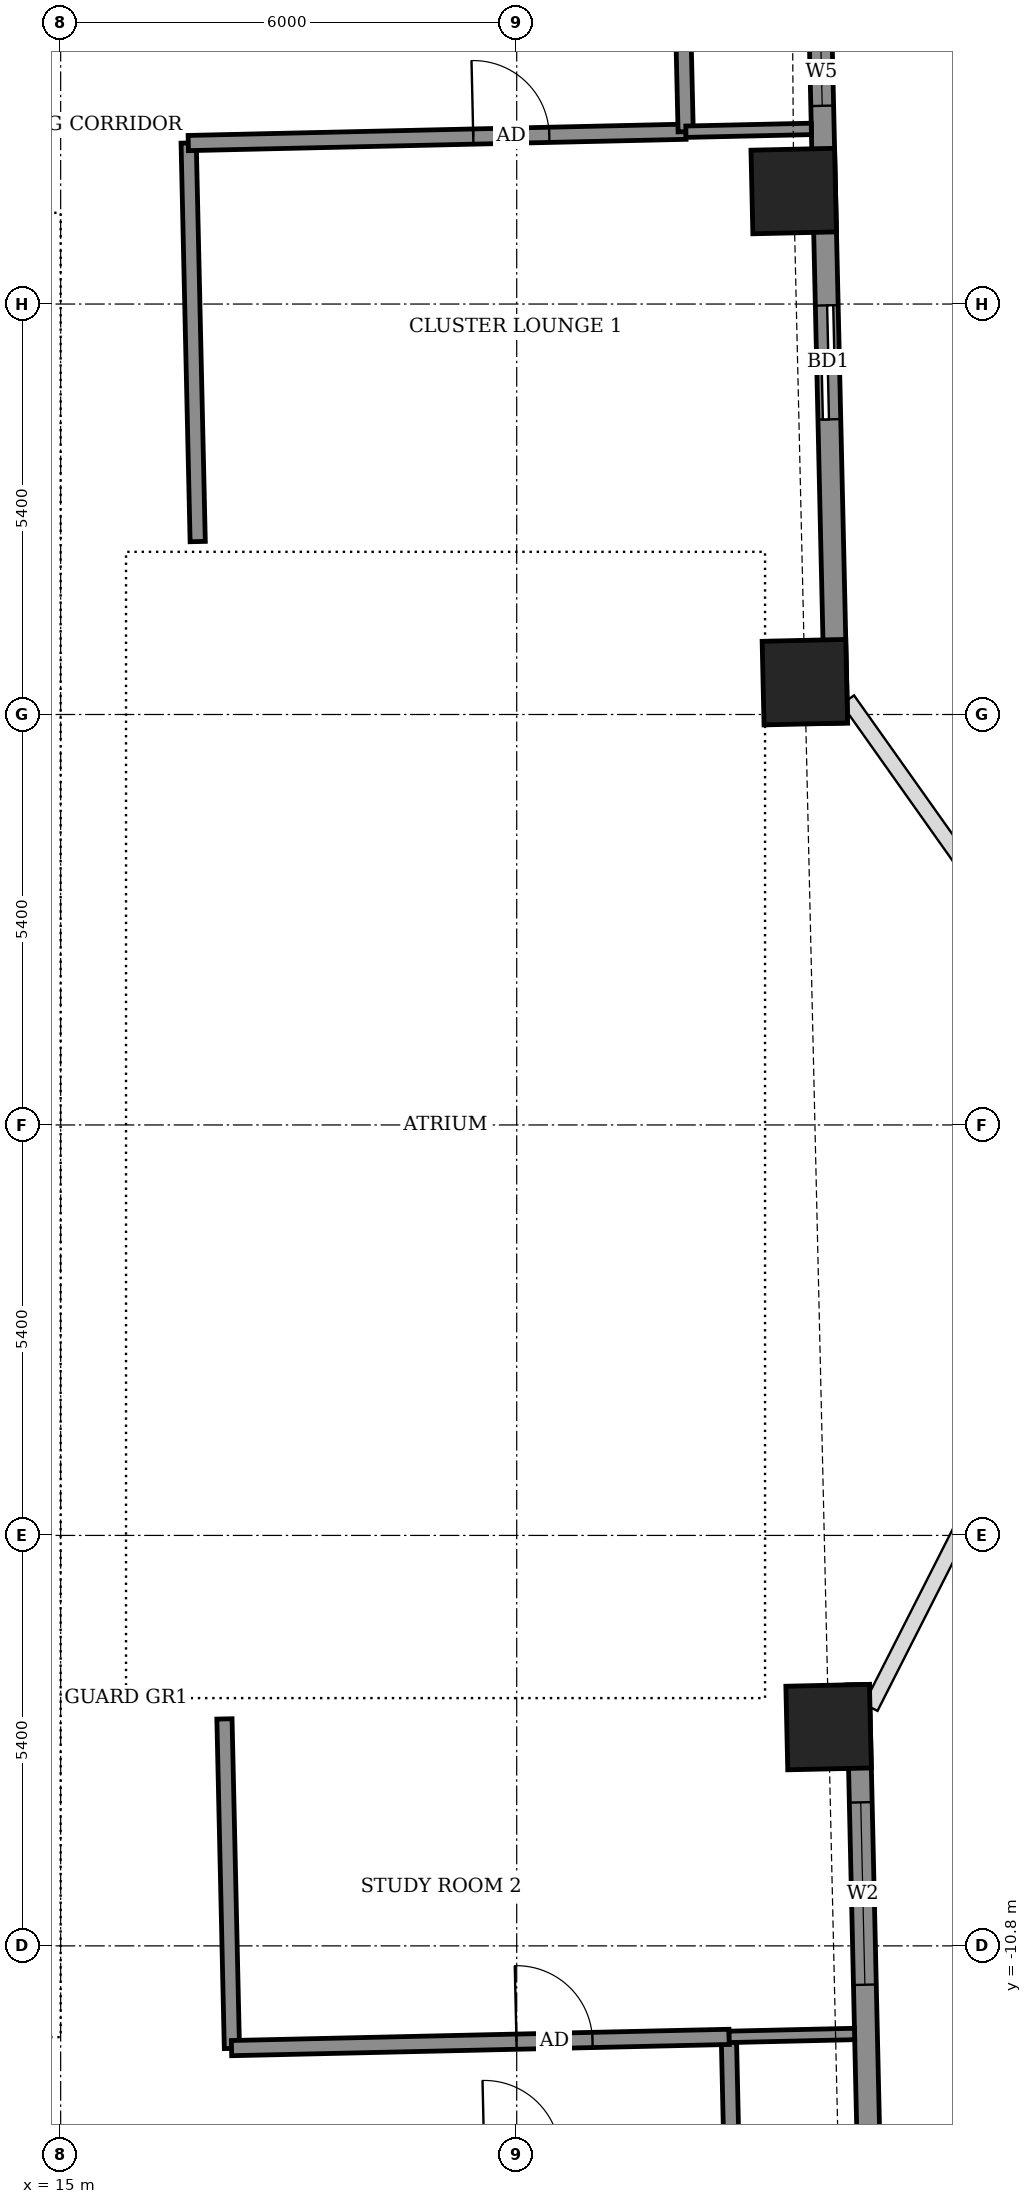
"""IFC4 building model, lengths in metres.
Left out: names, types, materials, properties, quantities, classifications, styles, units other than length and angle.
Written with IfcOpenShell. Run it as: python <this file> out.ifc"""

import sys

from ifc_helpers import new_model, si_unit, direction, frame, frame_2d, origin, origin_2d, place, context, subcontext, project, spatial, rectangle, extrude, element, fill, save


model = new_model("IFC4")
c1 = context("Model", 3, precision=1e-05, world=origin(), true_north=direction((0.0, 1.0)))
c2 = subcontext(c1, "Body", "Model", "MODEL_VIEW")
j1 = project(units=[si_unit("LENGTHUNIT", "METRE"), si_unit("PLANEANGLEUNIT", "RADIAN")], contexts=[c1])
p1 = place(None, origin())
s1 = spatial("IfcSite", under=j1, at=p1, CompositionType="ELEMENT")
p2 = place(p1, origin())
s2 = spatial("IfcBuilding", under=s1, at=p2, CompositionType="ELEMENT")
p3 = place(p2, frame((0.0, 0.0, 231.1)))
s3 = spatial("IfcBuildingStorey", under=s2, at=p3, CompositionType="ELEMENT", Elevation=231.1)
for number, where, z_axis, x_axis in (
    (1, (25.103, -7.921, -0.55), (0.0, 0.0, 1.0), (-0.023, 1.0, 0.0)),
    (2, (24.791, 5.825, -0.55), (0.0, 0.0, 1.0), (-0.023, 1.0, 0.0)),
    (3, (24.644, 12.287, -0.55), (0.0, 0.0, 1.0), (-0.023, 1.0, 0.0)),
):
    element("IfcColumn", number, at=place(p3, frame(where, z_axis=z_axis, x_axis=x_axis)), inside=s3, PredefinedType="COLUMN", context=c2, shape_type="SweptSolid", body=[
        extrude(rectangle(XDim=1.1, YDim=1.1, at=origin_2d()), origin(), (0.0, 0.0, 1.0), 3.6),
    ])
p4 = place(p3, frame((25.77, -19.684, 0.0), z_axis=(0.0, 0.0, 1.0), x_axis=(-0.022642656789, 0.999743622182, 0.0)))
e4 = element("IfcWall", 4, at=p4, inside=s3, PredefinedType="SOLIDWALL", context=c2, shape_type="SweptSolid", body=[
    extrude(rectangle(XDim=12.324, YDim=0.3, at=frame_2d((6.162, 0.0))), origin(), (0.0, 0.0, 1.0), 2.55),
])
p5 = place(p4, frame((2.38, 0.0, 0.0)))
e5 = element("IfcOpeningElement", 5, at=p5, cuts=e4, PredefinedType="OPENING", context=c2, shape_type="SweptSolid", body=[
    extrude(rectangle(XDim=1.5, YDim=2.4, at=frame_2d((0.75, 1.2))), frame((0.0, 0.16, 0.0), z_axis=(0.0, -1.0, 0.0), x_axis=(1.0, 0.0, 0.0)), (0.0, 0.0, 1.0), 0.32),
])
p6 = place(p4, frame((8.375, 0.0, 0.9)))
e6 = element("IfcOpeningElement", 6, at=p6, cuts=e4, PredefinedType="OPENING", context=c2, shape_type="SweptSolid", body=[
    extrude(rectangle(XDim=2.4, YDim=1.5, at=frame_2d((1.2, 0.75))), frame((0.0, 0.16, 0.0), z_axis=(0.0, -1.0, 0.0), x_axis=(1.0, 0.0, 0.0)), (0.0, 0.0, 1.0), 0.32),
])
p7 = place(p3, frame((25.204, 5.285, 0.0), z_axis=(0.0, 0.0, 1.0), x_axis=(-0.022756783174, 0.999741030877, 0.0)))
e7 = element("IfcWall", 7, at=p7, inside=s3, PredefinedType="SOLIDWALL", context=c2, shape_type="SweptSolid", body=[
    extrude(rectangle(XDim=13.324, YDim=0.3, at=frame_2d((6.662, 0.0))), origin(), (0.0, 0.0, 1.0), 2.55),
])
p8 = place(p7, frame((3.999, 0.0, 0.0)))
e8 = element("IfcOpeningElement", 8, at=p8, cuts=e7, PredefinedType="OPENING", context=c2, shape_type="SweptSolid", body=[
    extrude(rectangle(XDim=1.5, YDim=2.4, at=frame_2d((0.75, 1.2))), frame((0.0, 0.16, 0.0), z_axis=(0.0, -1.0, 0.0), x_axis=(1.0, 0.0, 0.0)), (0.0, 0.0, 1.0), 0.32),
])
p9 = place(p7, frame((8.125, 0.0, 0.9)))
e9 = element("IfcOpeningElement", 9, at=p9, cuts=e7, PredefinedType="OPENING", context=c2, shape_type="SweptSolid", body=[
    extrude(rectangle(XDim=0.9, YDim=1.5, at=frame_2d((0.45, 0.75))), frame((0.0, 0.16, 0.0), z_axis=(0.0, -1.0, 0.0), x_axis=(1.0, 0.0, 0.0)), (0.0, 0.0, 1.0), 0.32),
])
p10 = place(p7, frame((9.763, 0.0, 0.9)))
e10 = element("IfcOpeningElement", 10, at=p10, cuts=e7, PredefinedType="OPENING", context=c2, shape_type="SweptSolid", body=[
    extrude(rectangle(XDim=2.4, YDim=1.5, at=frame_2d((1.2, 0.75))), frame((0.0, 0.16, 0.0), z_axis=(0.0, -1.0, 0.0), x_axis=(1.0, 0.0, 0.0)), (0.0, 0.0, 1.0), 0.32),
])
p11 = place(p3, frame((23.825, -13.5, 0.0), z_axis=(0.0, 0.0, 1.0), x_axis=(-0.022632637625, 0.99974384905, 0.0)))
e11 = element("IfcWall", 11, at=p11, inside=s3, PredefinedType="PARTITIONING", context=c2, shape_type="SweptSolid", body=[
    extrude(rectangle(XDim=1.5, YDim=0.2, at=frame_2d((0.75, 0.0))), origin(), (0.0, 0.0, 1.0), 3.05),
])
p12 = place(p3, frame((17.253, -12.149, 0.0), z_axis=(0.0, 0.0, 1.0), x_axis=(-0.022578158225, 0.999745080894, 0.0)))
e12 = element("IfcWall", 12, at=p12, inside=s3, PredefinedType="PARTITIONING", context=c2, shape_type="SweptSolid", body=[
    extrude(rectangle(XDim=4.336, YDim=0.2, at=frame_2d((2.168, 0.0))), origin(), (0.0, 0.0, 1.0), 3.05),
])
p13 = place(p3, frame((17.248, -12.145, 0.0), z_axis=(0.0, 0.0, 1.0), x_axis=(0.999744752818, 0.022592680497, 0.0)))
e13 = element("IfcWall", 13, at=p13, inside=s3, PredefinedType="PARTITIONING", context=c2, shape_type="SweptSolid", body=[
    extrude(rectangle(XDim=6.549, YDim=0.2, at=frame_2d((3.274, 0.0))), origin(), (0.0, 0.0, 1.0), 3.05),
])
p14 = place(p13, frame((3.75, 0.0, 0.0)))
e14 = element("IfcOpeningElement", 14, at=p14, cuts=e13, PredefinedType="OPENING", context=c2, shape_type="SweptSolid", body=[
    extrude(rectangle(XDim=1.0, YDim=2.1, at=frame_2d((0.5, 1.05))), frame((0.0, 0.11, 0.0), z_axis=(0.0, -1.0, 0.0), x_axis=(1.0, 0.0, 0.0)), (0.0, 0.0, 1.0), 0.22),
])
p15 = place(p3, frame((23.795, -11.997, 0.0), z_axis=(0.0, 0.0, 1.0), x_axis=(0.999733755381, 0.023074192312, 0.0)))
e15 = element("IfcWall", 15, at=p15, inside=s3, PredefinedType="PARTITIONING", context=c2, shape_type="SweptSolid", body=[
    extrude(rectangle(XDim=1.651, YDim=0.15, at=frame_2d((0.825, 0.0))), origin(), (0.0, 0.0, 1.0), 2.55),
])
p16 = place(p3, frame((16.803, 7.675, 0.0), z_axis=(0.0, 0.0, 1.0), x_axis=(-0.022667483124, 0.999743059595, 0.0)))
e16 = element("IfcWall", 16, at=p16, inside=s3, PredefinedType="PARTITIONING", context=c2, shape_type="SweptSolid", body=[
    extrude(rectangle(XDim=5.245, YDim=0.2, at=frame_2d((2.623, 0.0))), origin(), (0.0, 0.0, 1.0), 3.05),
])
p17 = place(p3, frame((16.679, 12.918, 0.0), z_axis=(0.0, 0.0, 1.0), x_axis=(0.99974139269, 0.022740882632, 0.0)))
e17 = element("IfcWall", 17, at=p17, inside=s3, PredefinedType="PARTITIONING", context=c2, shape_type="SweptSolid", body=[
    extrude(rectangle(XDim=6.549, YDim=0.2, at=frame_2d((3.274, 0.0))), origin(), (0.0, 0.0, 1.0), 3.05),
])
p18 = place(p17, frame((3.75, 0.0, 0.0)))
e18 = element("IfcOpeningElement", 18, at=p18, cuts=e17, PredefinedType="OPENING", context=c2, shape_type="SweptSolid", body=[
    extrude(rectangle(XDim=1.0, YDim=2.1, at=frame_2d((0.5, 1.05))), frame((0.0, 0.11, 0.0), z_axis=(0.0, -1.0, 0.0), x_axis=(1.0, 0.0, 0.0)), (0.0, 0.0, 1.0), 0.22),
])
p19 = place(p3, frame((23.223, 13.067, 0.0), z_axis=(0.0, 0.0, 1.0), x_axis=(-0.023268438023, 0.999729253244, 0.0)))
e19 = element("IfcWall", 19, at=p19, inside=s3, PredefinedType="PARTITIONING", context=c2, shape_type="SweptSolid", body=[
    extrude(rectangle(XDim=1.5, YDim=0.2, at=frame_2d((0.75, 0.0))), origin(), (0.0, 0.0, 1.0), 3.05),
])
p20 = place(p3, frame((23.226, 13.067, 0.0), z_axis=(0.0, 0.0, 1.0), x_axis=(0.999747154012, 0.022486174521, 0.0)))
e20 = element("IfcWall", 20, at=p20, inside=s3, PredefinedType="PARTITIONING", context=c2, shape_type="SweptSolid", body=[
    extrude(rectangle(XDim=1.65, YDim=0.15, at=frame_2d((0.825, 0.0))), origin(), (0.0, 0.0, 1.0), 2.55),
])
p21 = place(p3, frame((-27.652, 13.413, 0.0), z_axis=(0.0, 0.0, 1.0), x_axis=(0.999742610679, 0.022687273792, 0.0)))
e21 = element("IfcWall", 21, at=p21, inside=s3, PredefinedType="PARTITIONING", context=c2, shape_type="SweptSolid", body=[
    extrude(rectangle(XDim=50.857, YDim=0.2, at=frame_2d((25.429, 0.0))), origin(), (0.0, 0.0, 1.0), 3.05),
])
p22 = place(p21, frame((49.179, 0.0, 0.0)))
e22 = element("IfcOpeningElement", 22, at=p22, cuts=e21, PredefinedType="OPENING", context=c2, shape_type="SweptSolid", body=[
    extrude(rectangle(XDim=1.0, YDim=2.1, at=frame_2d((0.5, 1.05))), frame((0.0, 0.11, 0.0), z_axis=(0.0, -1.0, 0.0), x_axis=(1.0, 0.0, 0.0)), (0.0, 0.0, 1.0), 0.22),
])
p23 = place(p21, frame((44.9, 0.0, 0.0)))
e23 = element("IfcOpeningElement", 23, at=p23, cuts=e21, PredefinedType="OPENING", context=c2, shape_type="SweptSolid", body=[
    extrude(rectangle(XDim=0.9, YDim=2.1, at=frame_2d((0.45, 1.05))), frame((0.0, 0.11, 0.0), z_axis=(0.0, -1.0, 0.0), x_axis=(1.0, 0.0, 0.0)), (0.0, 0.0, 1.0), 0.22),
])
p24 = place(p21, frame((40.375, 0.0, 0.0)))
e24 = element("IfcOpeningElement", 24, at=p24, cuts=e21, PredefinedType="OPENING", context=c2, shape_type="SweptSolid", body=[
    extrude(rectangle(XDim=0.9, YDim=2.1, at=frame_2d((0.45, 1.05))), frame((0.0, 0.11, 0.0), z_axis=(0.0, -1.0, 0.0), x_axis=(1.0, 0.0, 0.0)), (0.0, 0.0, 1.0), 0.22),
])
p25 = place(p21, frame((38.425, 0.0, 0.0)))
e25 = element("IfcOpeningElement", 25, at=p25, cuts=e21, PredefinedType="OPENING", context=c2, shape_type="SweptSolid", body=[
    extrude(rectangle(XDim=0.9, YDim=2.1, at=frame_2d((0.45, 1.05))), frame((0.0, 0.11, 0.0), z_axis=(0.0, -1.0, 0.0), x_axis=(1.0, 0.0, 0.0)), (0.0, 0.0, 1.0), 0.22),
])
p26 = place(p21, frame((31.625, 0.0, 0.0)))
e26 = element("IfcOpeningElement", 26, at=p26, cuts=e21, PredefinedType="OPENING", context=c2, shape_type="SweptSolid", body=[
    extrude(rectangle(XDim=0.9, YDim=2.1, at=frame_2d((0.45, 1.05))), frame((0.0, 0.11, 0.0), z_axis=(0.0, -1.0, 0.0), x_axis=(1.0, 0.0, 0.0)), (0.0, 0.0, 1.0), 0.22),
])
p27 = place(p21, frame((29.7, 0.0, 0.0)))
e27 = element("IfcOpeningElement", 27, at=p27, cuts=e21, PredefinedType="OPENING", context=c2, shape_type="SweptSolid", body=[
    extrude(rectangle(XDim=0.9, YDim=2.1, at=frame_2d((0.45, 1.05))), frame((0.0, 0.11, 0.0), z_axis=(0.0, -1.0, 0.0), x_axis=(1.0, 0.0, 0.0)), (0.0, 0.0, 1.0), 0.22),
])
p28 = place(p21, frame((22.95, 0.0, 0.0)))
e28 = element("IfcOpeningElement", 28, at=p28, cuts=e21, PredefinedType="OPENING", context=c2, shape_type="SweptSolid", body=[
    extrude(rectangle(XDim=0.9, YDim=2.1, at=frame_2d((0.45, 1.05))), frame((0.0, 0.11, 0.0), z_axis=(0.0, -1.0, 0.0), x_axis=(1.0, 0.0, 0.0)), (0.0, 0.0, 1.0), 0.22),
])
p29 = place(p21, frame((20.95, 0.0, 0.0)))
e29 = element("IfcOpeningElement", 29, at=p29, cuts=e21, PredefinedType="OPENING", context=c2, shape_type="SweptSolid", body=[
    extrude(rectangle(XDim=0.9, YDim=2.1, at=frame_2d((0.45, 1.05))), frame((0.0, 0.11, 0.0), z_axis=(0.0, -1.0, 0.0), x_axis=(1.0, 0.0, 0.0)), (0.0, 0.0, 1.0), 0.22),
])
p30 = place(p21, frame((14.15, 0.0, 0.0)))
e30 = element("IfcOpeningElement", 30, at=p30, cuts=e21, PredefinedType="OPENING", context=c2, shape_type="SweptSolid", body=[
    extrude(rectangle(XDim=0.9, YDim=2.1, at=frame_2d((0.45, 1.05))), frame((0.0, 0.11, 0.0), z_axis=(0.0, -1.0, 0.0), x_axis=(1.0, 0.0, 0.0)), (0.0, 0.0, 1.0), 0.22),
])
p31 = place(p21, frame((12.2, 0.0, 0.0)))
e31 = element("IfcOpeningElement", 31, at=p31, cuts=e21, PredefinedType="OPENING", context=c2, shape_type="SweptSolid", body=[
    extrude(rectangle(XDim=0.9, YDim=2.1, at=frame_2d((0.45, 1.05))), frame((0.0, 0.11, 0.0), z_axis=(0.0, -1.0, 0.0), x_axis=(1.0, 0.0, 0.0)), (0.0, 0.0, 1.0), 0.22),
])
p32 = place(p21, frame((2.05, 0.0, 0.0)))
e32 = element("IfcOpeningElement", 32, at=p32, cuts=e21, PredefinedType="OPENING", context=c2, shape_type="SweptSolid", body=[
    extrude(rectangle(XDim=1.0, YDim=2.1, at=frame_2d((0.5, 1.05))), frame((0.0, 0.11, 0.0), z_axis=(0.0, -1.0, 0.0), x_axis=(1.0, 0.0, 0.0)), (0.0, 0.0, 1.0), 0.22),
])
p33 = place(p21, frame((7.45, 0.0, 0.0)))
e33 = element("IfcOpeningElement", 33, at=p33, cuts=e21, PredefinedType="OPENING", context=c2, shape_type="SweptSolid", body=[
    extrude(rectangle(XDim=0.9, YDim=2.1, at=frame_2d((0.45, 1.05))), frame((0.0, 0.11, 0.0), z_axis=(0.0, -1.0, 0.0), x_axis=(1.0, 0.0, 0.0)), (0.0, 0.0, 1.0), 0.22),
])
p34 = place(p6, origin())
e34 = element("IfcWindow", 34, at=p34, inside=s3, PartitioningType="DOUBLE_PANEL_VERTICAL", PredefinedType="WINDOW", context=c2, shape_type="SweptSolid", body=[
    extrude(rectangle(XDim=2.4, YDim=1.5, at=frame_2d((1.2, 0.75))), frame((0.0, 0.03, 0.0), z_axis=(0.0, -1.0, 0.0), x_axis=(1.0, 0.0, 0.0)), (0.0, 0.0, 1.0), 0.06),
])
fill(e6, e34)
p35 = place(p8, origin())
e35 = element("IfcDoor", 35, at=p35, inside=s3, OperationType="SLIDING_TO_LEFT", PredefinedType="DOOR", context=c2, shape_type="SweptSolid", body=[
    extrude(rectangle(XDim=1.5, YDim=2.4, at=frame_2d((0.75, 1.2))), frame((0.0, 0.025, 0.0), z_axis=(0.0, -1.0, 0.0), x_axis=(1.0, 0.0, 0.0)), (0.0, 0.0, 1.0), 0.05),
])
fill(e8, e35)
p36 = place(p9, origin())
e36 = element("IfcWindow", 36, at=p36, inside=s3, PartitioningType="SINGLE_PANEL", PredefinedType="WINDOW", context=c2, shape_type="SweptSolid", body=[
    extrude(rectangle(XDim=0.9, YDim=1.5, at=frame_2d((0.45, 0.75))), frame((0.0, 0.03, 0.0), z_axis=(0.0, -1.0, 0.0), x_axis=(1.0, 0.0, 0.0)), (0.0, 0.0, 1.0), 0.06),
])
fill(e9, e36)
p37 = place(p14, origin())
e37 = element("IfcDoor", 37, at=p37, inside=s3, OperationType="SINGLE_SWING_LEFT", PredefinedType="DOOR", context=c2, shape_type="SweptSolid", body=[
    extrude(rectangle(XDim=1.0, YDim=2.1, at=frame_2d((0.5, 1.05))), frame((0.0, 0.025, 0.0), z_axis=(0.0, -1.0, 0.0), x_axis=(1.0, 0.0, 0.0)), (0.0, 0.0, 1.0), 0.05),
])
fill(e14, e37)
p38 = place(p18, origin())
e38 = element("IfcDoor", 38, at=p38, inside=s3, OperationType="SINGLE_SWING_RIGHT", PredefinedType="DOOR", context=c2, shape_type="SweptSolid", body=[
    extrude(rectangle(XDim=1.0, YDim=2.1, at=frame_2d((0.5, 1.05))), frame((0.0, 0.025, 0.0), z_axis=(0.0, -1.0, 0.0), x_axis=(1.0, 0.0, 0.0)), (0.0, 0.0, 1.0), 0.05),
])
fill(e18, e38)
save(model, sys.argv[1])
